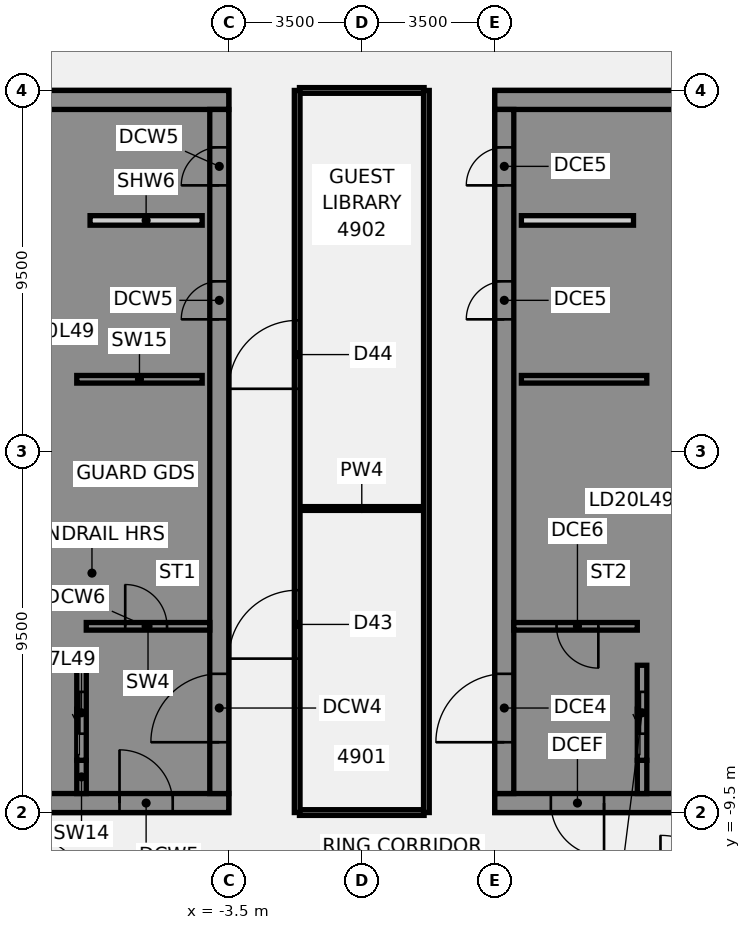
"""IFC4 building model, lengths in metres.
Left out: names, types, materials, properties, quantities, classifications, styles, units other than length and angle.
Written with IfcOpenShell. Run it as: python <this file> out.ifc"""

import sys

from ifc_helpers import new_model, si_unit, direction, frame, frame_2d, origin, place, context, subcontext, project, spatial, polyline, rectangle, outline, extrude, element, fill, save


model = new_model("IFC4")
c1 = context("Model", 3, precision=1e-05, world=origin(), true_north=direction((0.0, 1.0)))
c2 = subcontext(c1, "Body", "Model", "MODEL_VIEW")
j1 = project(units=[si_unit("LENGTHUNIT", "METRE"), si_unit("PLANEANGLEUNIT", "RADIAN")], contexts=[c1])
p1 = place(None, origin())
s1 = spatial("IfcSite", under=j1, at=p1, CompositionType="ELEMENT")
p2 = place(p1, origin())
s2 = spatial("IfcBuilding", under=s1, at=p2, CompositionType="ELEMENT")
p3 = place(p2, frame((0.0, 0.0, 196.9)))
s3 = spatial("IfcBuildingStorey", under=s2, at=p3, CompositionType="ELEMENT", Elevation=196.9)
p4 = place(p3, frame((-1.64, -9.5, 0.0), z_axis=(0.0, 0.0, 1.0), x_axis=(1.0, 0.0, 0.0)))
e1 = element("IfcWall", 1, at=p4, inside=s3, PredefinedType="PARTITIONING", context=c2, shape_type="SweptSolid", body=[
    extrude(rectangle(XDim=3.28, YDim=0.15, at=frame_2d((1.64, 0.0))), origin(), (0.0, 0.0, 1.0), 2.864),
])
p5 = place(p3, frame((-1.64, -1.5, 0.0), z_axis=(0.0, 0.0, 1.0), x_axis=(1.0, 0.0, 0.0)))
e2 = element("IfcWall", 2, at=p5, inside=s3, PredefinedType="PARTITIONING", context=c2, shape_type="SweptSolid", body=[
    extrude(rectangle(XDim=3.28, YDim=0.1, at=frame_2d((1.64, 0.0))), origin(), (0.0, 0.0, 1.0), 2.864),
])
p6 = place(p3, frame((-1.64, 9.5, 0.0), z_axis=(0.0, 0.0, 1.0), x_axis=(1.0, 0.0, 0.0)))
e3 = element("IfcWall", 3, at=p6, inside=s3, PredefinedType="PARTITIONING", context=c2, shape_type="SweptSolid", body=[
    extrude(rectangle(XDim=3.28, YDim=0.15, at=frame_2d((1.64, 0.0))), origin(), (0.0, 0.0, 1.0), 2.864),
])
p7 = place(p3, frame((-1.7, -9.5, 0.0), z_axis=(0.0, 0.0, 1.0), x_axis=(0.0, 1.0, 0.0)))
e4 = element("IfcWall", 4, at=p7, inside=s3, PredefinedType="PARTITIONING", context=c2, shape_type="SweptSolid", body=[
    extrude(rectangle(XDim=19.0, YDim=0.15, at=frame_2d((9.5, 0.0))), origin(), (0.0, 0.0, 1.0), 2.864),
])
p8 = place(p7, frame((4.05, 0.0, 0.0)))
e5 = element("IfcOpeningElement", 5, at=p8, cuts=e4, PredefinedType="OPENING", context=c2, shape_type="SweptSolid", body=[
    extrude(rectangle(XDim=1.8, YDim=2.1, at=frame_2d((0.9, 1.05))), frame((0.0, 0.085, 0.0), z_axis=(0.0, -1.0, 0.0), x_axis=(1.0, 0.0, 0.0)), (0.0, 0.0, 1.0), 0.17),
])
p9 = place(p7, frame((11.15, 0.0, 0.0)))
e6 = element("IfcOpeningElement", 6, at=p9, cuts=e4, PredefinedType="OPENING", context=c2, shape_type="SweptSolid", body=[
    extrude(rectangle(XDim=1.8, YDim=2.1, at=frame_2d((0.9, 1.05))), frame((0.0, 0.085, 0.0), z_axis=(0.0, -1.0, 0.0), x_axis=(1.0, 0.0, 0.0)), (0.0, 0.0, 1.0), 0.17),
])
p10 = place(p3, frame((1.7, -9.5, 0.0), z_axis=(0.0, 0.0, 1.0), x_axis=(0.0, 1.0, 0.0)))
e7 = element("IfcWall", 7, at=p10, inside=s3, PredefinedType="PARTITIONING", context=c2, shape_type="SweptSolid", body=[
    extrude(rectangle(XDim=19.0, YDim=0.15, at=frame_2d((9.5, 0.0))), origin(), (0.0, 0.0, 1.0), 2.864),
])
p11 = place(p3, frame((-16.5, -9.25, 0.0), z_axis=(0.0, 0.0, 1.0), x_axis=(1.0, 0.0, 0.0)))
e8 = element("IfcWall", 8, at=p11, inside=s3, PredefinedType="SHEAR", context=c2, shape_type="SweptSolid", body=[
    extrude(rectangle(XDim=13.0, YDim=0.5, at=frame_2d((6.5, 0.0))), origin(), (0.0, 0.0, 1.0), 3.46),
])
p12 = place(p11, frame((4.15, 0.0, 0.0)))
e9 = element("IfcOpeningElement", 9, at=p12, cuts=e8, PredefinedType="OPENING", context=c2, shape_type="SweptSolid", body=[
    extrude(rectangle(XDim=1.4, YDim=2.1, at=frame_2d((0.7, 1.05))), frame((0.0, 0.26, 0.0), z_axis=(0.0, -1.0, 0.0), x_axis=(1.0, 0.0, 0.0)), (0.0, 0.0, 1.0), 0.52),
])
p13 = place(p11, frame((10.125, 0.0, 0.0)))
e10 = element("IfcOpeningElement", 10, at=p13, cuts=e8, PredefinedType="OPENING", context=c2, shape_type="SweptSolid", body=[
    extrude(rectangle(XDim=1.4, YDim=2.1, at=frame_2d((0.7, 1.05))), frame((0.0, 0.26, 0.0), z_axis=(0.0, -1.0, 0.0), x_axis=(1.0, 0.0, 0.0)), (0.0, 0.0, 1.0), 0.52),
])
p14 = place(p3, frame((-16.5, 9.25, 0.0), z_axis=(0.0, 0.0, 1.0), x_axis=(1.0, 0.0, 0.0)))
e11 = element("IfcWall", 11, at=p14, inside=s3, PredefinedType="SHEAR", context=c2, shape_type="SweptSolid", body=[
    extrude(rectangle(XDim=13.0, YDim=0.5, at=frame_2d((6.5, 0.0))), origin(), (0.0, 0.0, 1.0), 3.46),
])
p15 = place(p3, origin())
e12 = element("IfcWall", 12, at=p15, inside=s3, PredefinedType="SHEAR", context=c2, shape_type="SweptSolid", body=[
    extrude(outline(polyline([(-9.8, -5.375), (-9.8, -5.625), (-7.5, -5.625), (-7.25, -5.625), (-7.25, 9.0), (-7.5, 9.0), (-9.8, 9.0), (-9.8, 8.125), (-7.5, 8.125), (-7.5, 5.625), (-9.8, 5.625), (-9.8, 5.375), (-7.5, 5.375), (-7.5, 2.875), (-9.8, 2.875), (-9.8, 2.625), (-7.5, 2.625), (-7.5, 0.125), (-9.8, 0.125), (-9.8, -0.125), (-7.5, -0.125), (-7.5, -2.625), (-9.8, -2.625), (-9.8, -2.875), (-7.5, -2.875), (-7.5, -5.375), (-9.8, -5.375)])), origin(), (0.0, 0.0, 1.0), 3.46),
])
p16 = place(p3, origin())
e13 = element("IfcWall", 13, at=p16, inside=s3, PredefinedType="SHEAR", context=c2, shape_type="SweptSolid", body=[
    extrude(outline(polyline([(-7.5, -8.125), (-9.55, -8.125), (-9.55, -5.625), (-9.8, -5.625), (-9.8, -8.125), (-9.8, -9.0), (-7.5, -9.0), (-7.5, -8.125)])), origin(), (0.0, 0.0, 1.0), 3.46),
])
p17 = place(p3, frame((-7.375, -9.0, 0.0), z_axis=(0.0, 0.0, 1.0), x_axis=(0.0, 1.0, 0.0)))
e14 = element("IfcWall", 14, at=p17, inside=s3, PredefinedType="SHEAR", context=c2, shape_type="SweptSolid", body=[
    extrude(rectangle(XDim=0.875, YDim=0.25, at=frame_2d((0.438, 0.0))), origin(), (0.0, 0.0, 1.0), 3.46),
])
p18 = place(p3, frame((-7.5, 1.9, 0.0), z_axis=(0.0, 0.0, 1.0), x_axis=(1.0, 0.0, 0.0)))
e15 = element("IfcWall", 15, at=p18, inside=s3, PredefinedType="SHEAR", context=c2, shape_type="SweptSolid", body=[
    extrude(rectangle(XDim=3.3, YDim=0.2, at=frame_2d((1.65, 0.0))), origin(), (0.0, 0.0, 1.0), 3.46),
])
p19 = place(p3, frame((-7.375, -8.125, 0.0), z_axis=(0.0, 0.0, 1.0), x_axis=(0.0, 1.0, 0.0)))
e16 = element("IfcWall", 16, at=p19, inside=s3, PredefinedType="SHEAR", context=c2, shape_type="SweptSolid", body=[
    extrude(rectangle(XDim=2.5, YDim=0.25, at=frame_2d((1.25, 0.0))), origin(), (0.0, 0.0, 1.0), 3.46),
])
p20 = place(p19, frame((0.7, 0.0, 0.0)))
e17 = element("IfcOpeningElement", 17, at=p20, cuts=e16, PredefinedType="OPENING", context=c2, shape_type="SweptSolid", body=[
    extrude(rectangle(XDim=1.1, YDim=2.1, at=frame_2d((0.55, 1.05))), frame((0.0, 0.135, 0.0), z_axis=(0.0, -1.0, 0.0), x_axis=(1.0, 0.0, 0.0)), (0.0, 0.0, 1.0), 0.27),
])
p21 = place(p3, frame((-3.75, -9.0, 0.0), z_axis=(0.0, 0.0, 1.0), x_axis=(0.0, 1.0, 0.0)))
e18 = element("IfcWall", 18, at=p21, inside=s3, PredefinedType="SHEAR", context=c2, shape_type="SweptSolid", body=[
    extrude(rectangle(XDim=18.0, YDim=0.5, at=frame_2d((9.0, 0.0))), origin(), (0.0, 0.0, 1.0), 3.46),
])
p22 = place(p21, frame((1.35, 0.0, 0.0)))
e19 = element("IfcOpeningElement", 19, at=p22, cuts=e18, PredefinedType="OPENING", context=c2, shape_type="SweptSolid", body=[
    extrude(rectangle(XDim=1.8, YDim=2.1, at=frame_2d((0.9, 1.05))), frame((0.0, 0.26, 0.0), z_axis=(0.0, -1.0, 0.0), x_axis=(1.0, 0.0, 0.0)), (0.0, 0.0, 1.0), 0.52),
])
p23 = place(p21, frame((12.478, 0.0, 0.0)))
e20 = element("IfcOpeningElement", 20, at=p23, cuts=e18, PredefinedType="OPENING", context=c2, shape_type="SweptSolid", body=[
    extrude(rectangle(XDim=1.0, YDim=2.1, at=frame_2d((0.5, 1.05))), frame((0.0, 0.26, 0.0), z_axis=(0.0, -1.0, 0.0), x_axis=(1.0, 0.0, 0.0)), (0.0, 0.0, 1.0), 0.52),
])
p24 = place(p21, frame((16.002, 0.0, 0.0)))
e21 = element("IfcOpeningElement", 21, at=p24, cuts=e18, PredefinedType="OPENING", context=c2, shape_type="SweptSolid", body=[
    extrude(rectangle(XDim=1.0, YDim=2.1, at=frame_2d((0.5, 1.05))), frame((0.0, 0.26, 0.0), z_axis=(0.0, -1.0, 0.0), x_axis=(1.0, 0.0, 0.0)), (0.0, 0.0, 1.0), 0.52),
])
p25 = place(p3, frame((-7.15, 6.08, 0.0), z_axis=(0.0, 0.0, 1.0), x_axis=(1.0, 0.0, 0.0)))
e22 = element("IfcWall", 22, at=p25, inside=s3, PredefinedType="PARTITIONING", context=c2, shape_type="SweptSolid", body=[
    extrude(rectangle(XDim=2.95, YDim=0.25, at=frame_2d((1.475, 0.0))), origin(), (0.0, 0.0, 1.0), 3.46),
])
p26 = place(p3, frame((-7.25, -4.6, 0.0), z_axis=(0.0, 0.0, 1.0), x_axis=(1.0, 0.0, 0.0)))
e23 = element("IfcWall", 23, at=p26, inside=s3, PredefinedType="SHEAR", context=c2, shape_type="SweptSolid", body=[
    extrude(rectangle(XDim=3.25, YDim=0.2, at=frame_2d((1.625, 0.0))), origin(), (0.0, 0.0, 1.0), 3.46),
])
p27 = place(p26, frame((1.025, 0.0, 0.0)))
e24 = element("IfcOpeningElement", 24, at=p27, cuts=e23, PredefinedType="OPENING", context=c2, shape_type="SweptSolid", body=[
    extrude(rectangle(XDim=1.1, YDim=2.1, at=frame_2d((0.55, 1.05))), frame((0.0, 0.11, 0.0), z_axis=(0.0, -1.0, 0.0), x_axis=(1.0, 0.0, 0.0)), (0.0, 0.0, 1.0), 0.22),
])
p28 = place(p3, frame((16.5, -9.25, 0.0), z_axis=(0.0, 0.0, 1.0), x_axis=(-1.0, 0.0, 0.0)))
e25 = element("IfcWall", 25, at=p28, inside=s3, PredefinedType="SHEAR", context=c2, shape_type="SweptSolid", body=[
    extrude(rectangle(XDim=13.0, YDim=0.5, at=frame_2d((6.5, 0.0))), origin(), (0.0, 0.0, 1.0), 3.46),
])
p29 = place(p28, frame((4.15, 0.0, 0.0)))
e26 = element("IfcOpeningElement", 26, at=p29, cuts=e25, PredefinedType="OPENING", context=c2, shape_type="SweptSolid", body=[
    extrude(rectangle(XDim=1.4, YDim=2.1, at=frame_2d((0.7, 1.05))), frame((0.0, 0.26, 0.0), z_axis=(0.0, -1.0, 0.0), x_axis=(1.0, 0.0, 0.0)), (0.0, 0.0, 1.0), 0.52),
])
p30 = place(p28, frame((10.125, 0.0, 0.0)))
e27 = element("IfcOpeningElement", 27, at=p30, cuts=e25, PredefinedType="OPENING", context=c2, shape_type="SweptSolid", body=[
    extrude(rectangle(XDim=1.4, YDim=2.1, at=frame_2d((0.7, 1.05))), frame((0.0, 0.26, 0.0), z_axis=(0.0, -1.0, 0.0), x_axis=(1.0, 0.0, 0.0)), (0.0, 0.0, 1.0), 0.52),
])
p31 = place(p3, frame((16.5, 9.25, 0.0), z_axis=(0.0, 0.0, 1.0), x_axis=(-1.0, 0.0, 0.0)))
e28 = element("IfcWall", 28, at=p31, inside=s3, PredefinedType="SHEAR", context=c2, shape_type="SweptSolid", body=[
    extrude(rectangle(XDim=13.0, YDim=0.5, at=frame_2d((6.5, 0.0))), origin(), (0.0, 0.0, 1.0), 3.46),
])
p32 = place(p3, origin())
e29 = element("IfcWall", 29, at=p32, inside=s3, PredefinedType="SHEAR", context=c2, shape_type="SweptSolid", body=[
    extrude(outline(polyline([(9.8, -5.375), (7.5, -5.375), (7.5, -2.875), (9.8, -2.875), (9.8, -2.625), (7.5, -2.625), (7.5, -0.125), (9.8, -0.125), (9.8, 0.125), (7.5, 0.125), (7.5, 2.625), (9.8, 2.625), (9.8, 2.875), (7.5, 2.875), (7.5, 5.375), (9.8, 5.375), (9.8, 5.625), (7.5, 5.625), (7.5, 8.125), (9.8, 8.125), (9.8, 9.0), (7.5, 9.0), (7.25, 9.0), (7.25, -5.625), (7.5, -5.625), (9.8, -5.625), (9.8, -5.375)])), origin(), (0.0, 0.0, 1.0), 3.46),
])
p33 = place(p3, origin())
e30 = element("IfcWall", 30, at=p33, inside=s3, PredefinedType="SHEAR", context=c2, shape_type="SweptSolid", body=[
    extrude(outline(polyline([(7.5, -8.125), (7.5, -9.0), (9.8, -9.0), (9.8, -8.125), (9.8, -5.625), (9.55, -5.625), (9.55, -8.125), (7.5, -8.125)])), origin(), (0.0, 0.0, 1.0), 3.46),
])
p34 = place(p3, frame((7.375, -9.0, 0.0), z_axis=(0.0, 0.0, 1.0), x_axis=(0.0, 1.0, 0.0)))
e31 = element("IfcWall", 31, at=p34, inside=s3, PredefinedType="SHEAR", context=c2, shape_type="SweptSolid", body=[
    extrude(rectangle(XDim=0.875, YDim=0.25, at=frame_2d((0.438, 0.0))), origin(), (0.0, 0.0, 1.0), 3.46),
])
p35 = place(p3, frame((7.5, 1.9, 0.0), z_axis=(0.0, 0.0, 1.0), x_axis=(-1.0, 0.0, 0.0)))
e32 = element("IfcWall", 32, at=p35, inside=s3, PredefinedType="SHEAR", context=c2, shape_type="SweptSolid", body=[
    extrude(rectangle(XDim=3.3, YDim=0.2, at=frame_2d((1.65, 0.0))), origin(), (0.0, 0.0, 1.0), 3.46),
])
p36 = place(p3, frame((7.375, -8.125, 0.0), z_axis=(0.0, 0.0, 1.0), x_axis=(0.0, 1.0, 0.0)))
e33 = element("IfcWall", 33, at=p36, inside=s3, PredefinedType="SHEAR", context=c2, shape_type="SweptSolid", body=[
    extrude(rectangle(XDim=2.5, YDim=0.25, at=frame_2d((1.25, 0.0))), origin(), (0.0, 0.0, 1.0), 3.46),
])
p37 = place(p36, frame((0.7, 0.0, 0.0)))
e34 = element("IfcOpeningElement", 34, at=p37, cuts=e33, PredefinedType="OPENING", context=c2, shape_type="SweptSolid", body=[
    extrude(rectangle(XDim=1.1, YDim=2.1, at=frame_2d((0.55, 1.05))), frame((0.0, 0.135, 0.0), z_axis=(0.0, -1.0, 0.0), x_axis=(1.0, 0.0, 0.0)), (0.0, 0.0, 1.0), 0.27),
])
p38 = place(p3, frame((3.75, -9.0, 0.0), z_axis=(0.0, 0.0, 1.0), x_axis=(0.0, 1.0, 0.0)))
e35 = element("IfcWall", 35, at=p38, inside=s3, PredefinedType="SHEAR", context=c2, shape_type="SweptSolid", body=[
    extrude(rectangle(XDim=18.0, YDim=0.5, at=frame_2d((9.0, 0.0))), origin(), (0.0, 0.0, 1.0), 3.46),
])
p39 = place(p38, frame((1.35, 0.0, 0.0)))
e36 = element("IfcOpeningElement", 36, at=p39, cuts=e35, PredefinedType="OPENING", context=c2, shape_type="SweptSolid", body=[
    extrude(rectangle(XDim=1.8, YDim=2.1, at=frame_2d((0.9, 1.05))), frame((0.0, 0.26, 0.0), z_axis=(0.0, -1.0, 0.0), x_axis=(1.0, 0.0, 0.0)), (0.0, 0.0, 1.0), 0.52),
])
p40 = place(p38, frame((12.478, 0.0, 0.0)))
e37 = element("IfcOpeningElement", 37, at=p40, cuts=e35, PredefinedType="OPENING", context=c2, shape_type="SweptSolid", body=[
    extrude(rectangle(XDim=1.0, YDim=2.1, at=frame_2d((0.5, 1.05))), frame((0.0, 0.26, 0.0), z_axis=(0.0, -1.0, 0.0), x_axis=(1.0, 0.0, 0.0)), (0.0, 0.0, 1.0), 0.52),
])
p41 = place(p38, frame((16.002, 0.0, 0.0)))
e38 = element("IfcOpeningElement", 38, at=p41, cuts=e35, PredefinedType="OPENING", context=c2, shape_type="SweptSolid", body=[
    extrude(rectangle(XDim=1.0, YDim=2.1, at=frame_2d((0.5, 1.05))), frame((0.0, 0.26, 0.0), z_axis=(0.0, -1.0, 0.0), x_axis=(1.0, 0.0, 0.0)), (0.0, 0.0, 1.0), 0.52),
])
p42 = place(p3, frame((7.15, 6.08, 0.0), z_axis=(0.0, 0.0, 1.0), x_axis=(-1.0, 0.0, 0.0)))
e39 = element("IfcWall", 39, at=p42, inside=s3, PredefinedType="PARTITIONING", context=c2, shape_type="SweptSolid", body=[
    extrude(rectangle(XDim=2.95, YDim=0.25, at=frame_2d((1.475, 0.0))), origin(), (0.0, 0.0, 1.0), 3.46),
])
p43 = place(p3, frame((7.25, -4.6, 0.0), z_axis=(0.0, 0.0, 1.0), x_axis=(-1.0, 0.0, 0.0)))
e40 = element("IfcWall", 40, at=p43, inside=s3, PredefinedType="SHEAR", context=c2, shape_type="SweptSolid", body=[
    extrude(rectangle(XDim=3.25, YDim=0.2, at=frame_2d((1.625, 0.0))), origin(), (0.0, 0.0, 1.0), 3.46),
])
p44 = place(p43, frame((1.025, 0.0, 0.0)))
e41 = element("IfcOpeningElement", 41, at=p44, cuts=e40, PredefinedType="OPENING", context=c2, shape_type="SweptSolid", body=[
    extrude(rectangle(XDim=1.1, YDim=2.1, at=frame_2d((0.55, 1.05))), frame((0.0, 0.11, 0.0), z_axis=(0.0, -1.0, 0.0), x_axis=(1.0, 0.0, 0.0)), (0.0, 0.0, 1.0), 0.22),
])
p45 = place(p8, frame((1.8, 0.0, 0.0), z_axis=(0.0, 0.0, 1.0), x_axis=(-1.0, 0.0, 0.0)))
e42 = element("IfcDoor", 42, at=p45, inside=s3, OperationType="DOUBLE_DOOR_SINGLE_SWING", PredefinedType="DOOR", context=c2, shape_type="SweptSolid", body=[
    extrude(rectangle(XDim=1.8, YDim=2.1, at=frame_2d((0.9, 1.05))), frame((0.0, 0.025, 0.0), z_axis=(0.0, -1.0, 0.0), x_axis=(1.0, 0.0, 0.0)), (0.0, 0.0, 1.0), 0.05),
])
fill(e5, e42)
p46 = place(p9, frame((1.8, 0.0, 0.0), z_axis=(0.0, 0.0, 1.0), x_axis=(-1.0, 0.0, 0.0)))
e43 = element("IfcDoor", 43, at=p46, inside=s3, OperationType="DOUBLE_DOOR_SINGLE_SWING", PredefinedType="DOOR", context=c2, shape_type="SweptSolid", body=[
    extrude(rectangle(XDim=1.8, YDim=2.1, at=frame_2d((0.9, 1.05))), frame((0.0, 0.025, 0.0), z_axis=(0.0, -1.0, 0.0), x_axis=(1.0, 0.0, 0.0)), (0.0, 0.0, 1.0), 0.05),
])
fill(e6, e43)
p47 = place(p13, origin())
e44 = element("IfcDoor", 44, at=p47, inside=s3, OperationType="SINGLE_SWING_LEFT", PredefinedType="DOOR", context=c2, shape_type="SweptSolid", body=[
    extrude(rectangle(XDim=1.4, YDim=2.1, at=frame_2d((0.7, 1.05))), frame((0.0, 0.025, 0.0), z_axis=(0.0, -1.0, 0.0), x_axis=(1.0, 0.0, 0.0)), (0.0, 0.0, 1.0), 0.05),
])
fill(e10, e44)
p48 = place(p22, origin())
e45 = element("IfcDoor", 45, at=p48, inside=s3, OperationType="SINGLE_SWING_LEFT", PredefinedType="DOOR", context=c2, shape_type="SweptSolid", body=[
    extrude(rectangle(XDim=1.8, YDim=2.1, at=frame_2d((0.9, 1.05))), frame((0.0, 0.025, 0.0), z_axis=(0.0, -1.0, 0.0), x_axis=(1.0, 0.0, 0.0)), (0.0, 0.0, 1.0), 0.05),
])
fill(e19, e45)
p49 = place(p23, origin())
e46 = element("IfcDoor", 46, at=p49, inside=s3, OperationType="SINGLE_SWING_LEFT", PredefinedType="DOOR", context=c2, shape_type="SweptSolid", body=[
    extrude(rectangle(XDim=1.0, YDim=2.1, at=frame_2d((0.5, 1.05))), frame((0.0, 0.225, 0.0), z_axis=(0.0, -1.0, 0.0), x_axis=(1.0, 0.0, 0.0)), (0.0, 0.0, 1.0), 0.05),
])
fill(e20, e46)
p50 = place(p24, origin())
e47 = element("IfcDoor", 47, at=p50, inside=s3, OperationType="SINGLE_SWING_LEFT", PredefinedType="DOOR", context=c2, shape_type="SweptSolid", body=[
    extrude(rectangle(XDim=1.0, YDim=2.1, at=frame_2d((0.5, 1.05))), frame((0.0, 0.225, 0.0), z_axis=(0.0, -1.0, 0.0), x_axis=(1.0, 0.0, 0.0)), (0.0, 0.0, 1.0), 0.05),
])
fill(e21, e47)
p51 = place(p27, origin())
e48 = element("IfcDoor", 48, at=p51, inside=s3, OperationType="SINGLE_SWING_LEFT", PredefinedType="DOOR", context=c2, shape_type="SweptSolid", body=[
    extrude(rectangle(XDim=1.1, YDim=2.1, at=frame_2d((0.55, 1.05))), frame((0.0, 0.025, 0.0), z_axis=(0.0, -1.0, 0.0), x_axis=(1.0, 0.0, 0.0)), (0.0, 0.0, 1.0), 0.05),
])
fill(e24, e48)
p52 = place(p20, origin())
e49 = element("IfcDoor", 49, at=p52, inside=s3, OperationType="SLIDING_TO_LEFT", PredefinedType="DOOR", context=c2, shape_type="SweptSolid", body=[
    extrude(rectangle(XDim=1.1, YDim=2.1, at=frame_2d((0.55, 1.05))), frame((0.0, 0.025, 0.0), z_axis=(0.0, -1.0, 0.0), x_axis=(1.0, 0.0, 0.0)), (0.0, 0.0, 1.0), 0.05),
])
fill(e17, e49)
p53 = place(p30, origin())
e50 = element("IfcDoor", 50, at=p53, inside=s3, OperationType="SINGLE_SWING_LEFT", PredefinedType="DOOR", context=c2, shape_type="SweptSolid", body=[
    extrude(rectangle(XDim=1.4, YDim=2.1, at=frame_2d((0.7, 1.05))), frame((0.0, 0.025, 0.0), z_axis=(0.0, -1.0, 0.0), x_axis=(1.0, 0.0, 0.0)), (0.0, 0.0, 1.0), 0.05),
])
fill(e27, e50)
p54 = place(p39, origin())
e51 = element("IfcDoor", 51, at=p54, inside=s3, OperationType="SINGLE_SWING_LEFT", PredefinedType="DOOR", context=c2, shape_type="SweptSolid", body=[
    extrude(rectangle(XDim=1.8, YDim=2.1, at=frame_2d((0.9, 1.05))), frame((0.0, 0.025, 0.0), z_axis=(0.0, -1.0, 0.0), x_axis=(1.0, 0.0, 0.0)), (0.0, 0.0, 1.0), 0.05),
])
fill(e36, e51)
p55 = place(p40, origin())
e52 = element("IfcDoor", 52, at=p55, inside=s3, OperationType="SINGLE_SWING_LEFT", PredefinedType="DOOR", context=c2, shape_type="SweptSolid", body=[
    extrude(rectangle(XDim=1.0, YDim=2.1, at=frame_2d((0.5, 1.05))), frame((0.0, -0.175, 0.0), z_axis=(0.0, -1.0, 0.0), x_axis=(1.0, 0.0, 0.0)), (0.0, 0.0, 1.0), 0.05),
])
fill(e37, e52)
p56 = place(p41, origin())
e53 = element("IfcDoor", 53, at=p56, inside=s3, OperationType="SINGLE_SWING_LEFT", PredefinedType="DOOR", context=c2, shape_type="SweptSolid", body=[
    extrude(rectangle(XDim=1.0, YDim=2.1, at=frame_2d((0.5, 1.05))), frame((0.0, -0.175, 0.0), z_axis=(0.0, -1.0, 0.0), x_axis=(1.0, 0.0, 0.0)), (0.0, 0.0, 1.0), 0.05),
])
fill(e38, e53)
p57 = place(p44, origin())
e54 = element("IfcDoor", 54, at=p57, inside=s3, OperationType="SINGLE_SWING_LEFT", PredefinedType="DOOR", context=c2, shape_type="SweptSolid", body=[
    extrude(rectangle(XDim=1.1, YDim=2.1, at=frame_2d((0.55, 1.05))), frame((0.0, 0.025, 0.0), z_axis=(0.0, -1.0, 0.0), x_axis=(1.0, 0.0, 0.0)), (0.0, 0.0, 1.0), 0.05),
])
fill(e41, e54)
p58 = place(p37, origin())
e55 = element("IfcDoor", 55, at=p58, inside=s3, OperationType="SLIDING_TO_LEFT", PredefinedType="DOOR", context=c2, shape_type="SweptSolid", body=[
    extrude(rectangle(XDim=1.1, YDim=2.1, at=frame_2d((0.55, 1.05))), frame((0.0, 0.025, 0.0), z_axis=(0.0, -1.0, 0.0), x_axis=(1.0, 0.0, 0.0)), (0.0, 0.0, 1.0), 0.05),
])
fill(e34, e55)
save(model, sys.argv[1])
